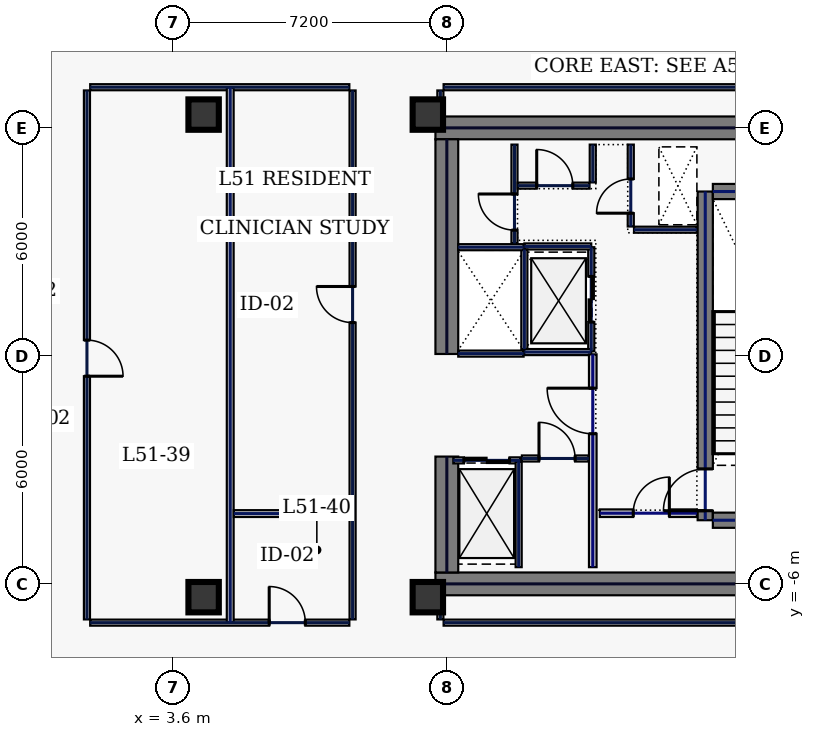
"""IFC4 building model, lengths in metres.
Left out: names, types, materials, properties, quantities, classifications, styles, units other than length and angle.
Written with IfcOpenShell. Run it as: python <this file> out.ifc"""

import sys

from ifc_helpers import new_model, si_unit, direction, frame, frame_2d, origin, origin_2d, place, context, subcontext, project, spatial, rectangle, hollow_rectangle, extrude, element, fill, save


model = new_model("IFC4")
c1 = context("Model", 3, precision=1e-05, world=origin(), true_north=direction((0.0, 1.0)))
c2 = subcontext(c1, "Body", "Model", "MODEL_VIEW")
j1 = project(units=[si_unit("LENGTHUNIT", "METRE"), si_unit("PLANEANGLEUNIT", "RADIAN")], contexts=[c1])
p1 = place(None, origin())
s1 = spatial("IfcSite", under=j1, at=p1, CompositionType="ELEMENT")
p2 = place(p1, origin())
s2 = spatial("IfcBuilding", under=s1, at=p2, CompositionType="ELEMENT")
p3 = place(p2, frame((0.0, 0.0, 222.2)))
s3 = spatial("IfcBuildingStorey", under=s2, at=p3, CompositionType="ELEMENT", Elevation=222.2)
for number, where, z_axis, x_axis in (
    (1, (10.5, 6.0, 0.0), (0.0, 0.0, 1.0), (1.0, 0.0, 0.0)),
    (2, (10.5, -6.0, 0.0), (0.0, 0.0, 1.0), (1.0, 0.0, 0.0)),
):
    element("IfcWall", number, at=place(p3, frame(where, z_axis=z_axis, x_axis=x_axis)), inside=s3, PredefinedType="SHEAR", context=c2, shape_type="SweptSolid", body=[
        extrude(rectangle(XDim=11.5, YDim=0.6, at=frame_2d((5.75, 0.0))), origin(), (0.0, 0.0, 1.0), 3.74),
    ])
p4 = place(p3, frame((10.8, -5.7, 0.0), z_axis=(0.0, 0.0, 1.0), x_axis=(0.0, 1.0, 0.0)))
e3 = element("IfcWall", 3, at=p4, inside=s3, PredefinedType="SHEAR", context=c2, shape_type="SweptSolid", body=[
    extrude(rectangle(XDim=3.05, YDim=0.6, at=frame_2d((1.525, 0.0))), origin(), (0.0, 0.0, 1.0), 3.74),
])
p5 = place(p3, frame((10.8, 0.05, 0.0), z_axis=(0.0, 0.0, 1.0), x_axis=(0.0, 1.0, 0.0)))
e4 = element("IfcWall", 4, at=p5, inside=s3, PredefinedType="SHEAR", context=c2, shape_type="SweptSolid", body=[
    extrude(rectangle(XDim=5.65, YDim=0.6, at=frame_2d((2.825, 0.0))), origin(), (0.0, 0.0, 1.0), 3.74),
])
p6 = place(p3, frame((17.6, -4.325, 0.0), z_axis=(0.0, 0.0, 1.0), x_axis=(0.0, 1.0, 0.0)))
e5 = element("IfcWall", 5, at=p6, inside=s3, PredefinedType="SHEAR", context=c2, shape_type="SweptSolid", body=[
    extrude(rectangle(XDim=8.65, YDim=0.4, at=frame_2d((4.325, 0.0))), origin(), (0.0, 0.0, 1.0), 3.74),
])
p7 = place(p6, frame((0.25, 0.0, 0.0)))
e6 = element("IfcOpeningElement", 6, at=p7, cuts=e5, PredefinedType="OPENING", context=c2, shape_type="SweptSolid", body=[
    extrude(rectangle(XDim=1.1, YDim=2.2, at=frame_2d((0.55, 1.1))), frame((0.0, 0.21, 0.0), z_axis=(0.0, -1.0, 0.0), x_axis=(1.0, 0.0, 0.0)), (0.0, 0.0, 1.0), 0.42),
])
for number, where, z_axis, x_axis in (
    (7, (17.8, -4.325, 0.0), (0.0, 0.0, 1.0), (1.0, 0.0, 0.0)),
    (8, (17.8, 4.325, 0.0), (0.0, 0.0, 1.0), (1.0, 0.0, 0.0)),
):
    element("IfcWall", number, at=place(p3, frame(where, z_axis=z_axis, x_axis=x_axis)), inside=s3, PredefinedType="SHEAR", context=c2, shape_type="SweptSolid", body=[
        extrude(rectangle(XDim=3.4, YDim=0.4, at=frame_2d((1.7, 0.0))), origin(), (0.0, 0.0, 1.0), 3.74),
    ])
for number, where, z_axis, x_axis in (
    (9, (10.3, -6.35, 0.0), (0.0, 0.0, 1.0), (1.0, 0.0, 0.0)),
    (10, (10.3, 6.35, 0.0), (0.0, 0.0, 1.0), (1.0, 0.0, 0.0)),
    (11, (4.4, -6.35, 0.0), (0.0, 0.0, 1.0), (1.0, 0.0, 0.0)),
    (12, (4.4, 6.35, 0.0), (0.0, 0.0, 1.0), (1.0, 0.0, 0.0)),
):
    element("IfcColumn", number, at=place(p3, frame(where, z_axis=z_axis, x_axis=x_axis)), inside=s3, PredefinedType="COLUMN", context=c2, shape_type="SweptSolid", body=[
        extrude(hollow_rectangle(XDim=0.8, YDim=0.8, WallThickness=0.036, at=origin_2d()), origin(), (0.0, 0.0, 1.0), 3.74),
    ])
p8 = place(p3, frame((14.6, 0.12, 0.0), z_axis=(0.0, 0.0, 1.0), x_axis=(0.0, 1.0, 0.0)))
e13 = element("IfcWall", 13, at=p8, inside=s3, PredefinedType="PARTITIONING", context=c2, shape_type="SweptSolid", body=[
    extrude(rectangle(XDim=2.74, YDim=0.16, at=frame_2d((1.37, 0.0))), origin(), (0.0, 0.0, 1.0), 3.74),
])
p9 = place(p8, frame((0.77, 0.0, 0.0)))
e14 = element("IfcOpeningElement", 14, at=p9, cuts=e13, PredefinedType="OPENING", context=c2, shape_type="SweptSolid", body=[
    extrude(rectangle(XDim=1.2, YDim=2.2, at=frame_2d((0.6, 1.1))), frame((0.0, 0.09, 0.0), z_axis=(0.0, -1.0, 0.0), x_axis=(1.0, 0.0, 0.0)), (0.0, 0.0, 1.0), 0.18),
])
for number, where, z_axis, x_axis in (
    (15, (12.84, 0.1, 0.0), (0.0, 0.0, 1.0), (1.0, 0.0, 0.0)),
    (16, (12.84, 2.88, 0.0), (0.0, 0.0, 1.0), (1.0, 0.0, 0.0)),
):
    element("IfcWall", number, at=place(p3, frame(where, z_axis=z_axis, x_axis=x_axis)), inside=s3, PredefinedType="PARTITIONING", context=c2, shape_type="SweptSolid", body=[
        extrude(rectangle(XDim=1.76, YDim=0.16, at=frame_2d((0.88, 0.0))), origin(), (0.0, 0.0, 1.0), 3.74),
    ])
p10 = place(p3, frame((12.84, 0.18, 0.0), z_axis=(0.0, 0.0, 1.0), x_axis=(0.0, 1.0, 0.0)))
e17 = element("IfcWall", 17, at=p10, inside=s3, PredefinedType="PARTITIONING", context=c2, shape_type="SweptSolid", body=[
    extrude(rectangle(XDim=2.62, YDim=0.16, at=frame_2d((1.31, 0.0))), origin(), (0.0, 0.0, 1.0), 3.74),
])
p11 = place(p3, frame((10.97, -2.75, 0.0), z_axis=(0.0, 0.0, 1.0), x_axis=(1.0, 0.0, 0.0)))
e18 = element("IfcWall", 18, at=p11, inside=s3, PredefinedType="PARTITIONING", context=c2, shape_type="SweptSolid", body=[
    extrude(rectangle(XDim=1.76, YDim=0.16, at=frame_2d((0.88, 0.0))), origin(), (0.0, 0.0, 1.0), 3.74),
])
p12 = place(p11, frame((0.28, 0.0, 0.0)))
e19 = element("IfcOpeningElement", 19, at=p12, cuts=e18, PredefinedType="OPENING", context=c2, shape_type="SweptSolid", body=[
    extrude(rectangle(XDim=1.2, YDim=2.2, at=frame_2d((0.6, 1.1))), frame((0.0, 0.09, 0.0), z_axis=(0.0, -1.0, 0.0), x_axis=(1.0, 0.0, 0.0)), (0.0, 0.0, 1.0), 0.18),
])
for number, where, z_axis, x_axis in (
    (20, (11.1, 0.06, 0.0), (0.0, 0.0, 1.0), (1.0, 0.0, 0.0)),
    (21, (11.1, 2.86, 0.0), (0.0, 0.0, 1.0), (1.0, 0.0, 0.0)),
):
    element("IfcWall", number, at=place(p3, frame(where, z_axis=z_axis, x_axis=x_axis)), inside=s3, PredefinedType="PARTITIONING", context=c2, shape_type="SweptSolid", body=[
        extrude(rectangle(XDim=1.72, YDim=0.16, at=frame_2d((0.86, 0.0))), origin(), (0.0, 0.0, 1.0), 3.74),
    ])
p13 = place(p3, frame((15.64, 3.405, 0.0), z_axis=(0.0, 0.0, 1.0), x_axis=(0.0, 1.0, 0.0)))
e22 = element("IfcWall", 22, at=p13, inside=s3, PredefinedType="PARTITIONING", context=c2, shape_type="SweptSolid", body=[
    extrude(rectangle(XDim=2.155, YDim=0.16, at=frame_2d((1.078, 0.0))), origin(), (0.0, 0.0, 1.0), 3.74),
])
p14 = place(p13, frame((0.35, 0.0, 0.0)))
e23 = element("IfcOpeningElement", 23, at=p14, cuts=e22, PredefinedType="OPENING", context=c2, shape_type="SweptSolid", body=[
    extrude(rectangle(XDim=0.9, YDim=2.2, at=frame_2d((0.45, 1.1))), frame((0.0, 0.09, 0.0), z_axis=(0.0, -1.0, 0.0), x_axis=(1.0, 0.0, 0.0)), (0.0, 0.0, 1.0), 0.18),
])
p15 = place(p3, frame((15.725, 3.32, 0.0), z_axis=(0.0, 0.0, 1.0), x_axis=(1.0, 0.0, 0.0)))
e24 = element("IfcWall", 24, at=p15, inside=s3, PredefinedType="PARTITIONING", context=c2, shape_type="SweptSolid", body=[
    extrude(rectangle(XDim=1.655, YDim=0.16, at=frame_2d((0.827, 0.0))), origin(), (0.0, 0.0, 1.0), 3.74),
])
p16 = place(p3, frame((14.825, -4.14, 0.0), z_axis=(0.0, 0.0, 1.0), x_axis=(1.0, 0.0, 0.0)))
e25 = element("IfcWall", 25, at=p16, inside=s3, PredefinedType="SOLIDWALL", context=c2, shape_type="SweptSolid", body=[
    extrude(rectangle(XDim=2.555, YDim=0.2, at=frame_2d((1.277, 0.0))), origin(), (0.0, 0.0, 1.0), 3.74),
])
p17 = place(p16, frame((0.88, 0.0, 0.0)))
e26 = element("IfcOpeningElement", 26, at=p17, cuts=e25, PredefinedType="OPENING", context=c2, shape_type="SweptSolid", body=[
    extrude(rectangle(XDim=0.95, YDim=2.2, at=frame_2d((0.475, 1.1))), frame((0.0, 0.11, 0.0), z_axis=(0.0, -1.0, 0.0), x_axis=(1.0, 0.0, 0.0)), (0.0, 0.0, 1.0), 0.22),
])
p18 = place(p3, frame((12.775, -2.7, 0.0), z_axis=(0.0, 0.0, 1.0), x_axis=(1.0, 0.0, 0.0)))
e27 = element("IfcWall", 27, at=p18, inside=s3, PredefinedType="PARTITIONING", context=c2, shape_type="SweptSolid", body=[
    extrude(rectangle(XDim=1.76, YDim=0.16, at=frame_2d((0.88, 0.0))), origin(), (0.0, 0.0, 1.0), 3.74),
])
p19 = place(p18, frame((0.45, 0.0, 0.0)))
e28 = element("IfcOpeningElement", 28, at=p19, cuts=e27, PredefinedType="OPENING", context=c2, shape_type="SweptSolid", body=[
    extrude(rectangle(XDim=0.95, YDim=2.2, at=frame_2d((0.475, 1.1))), frame((0.0, 0.09, 0.0), z_axis=(0.0, -1.0, 0.0), x_axis=(1.0, 0.0, 0.0)), (0.0, 0.0, 1.0), 0.18),
])
p20 = place(p3, frame((12.69, -5.56, 0.0), z_axis=(0.0, 0.0, 1.0), x_axis=(0.0, 1.0, 0.0)))
e29 = element("IfcWall", 29, at=p20, inside=s3, PredefinedType="PARTITIONING", context=c2, shape_type="SweptSolid", body=[
    extrude(rectangle(XDim=2.775, YDim=0.16, at=frame_2d((1.388, 0.0))), origin(), (0.0, 0.0, 1.0), 3.74),
])
p21 = place(p3, frame((12.58, 2.96, 0.0), z_axis=(0.0, 0.0, 1.0), x_axis=(0.0, 1.0, 0.0)))
e30 = element("IfcWall", 30, at=p21, inside=s3, PredefinedType="PARTITIONING", context=c2, shape_type="SweptSolid", body=[
    extrude(rectangle(XDim=2.6, YDim=0.16, at=frame_2d((1.3, 0.0))), origin(), (0.0, 0.0, 1.0), 3.74),
])
p22 = place(p21, frame((0.35, 0.0, 0.0)))
e31 = element("IfcOpeningElement", 31, at=p22, cuts=e30, PredefinedType="OPENING", context=c2, shape_type="SweptSolid", body=[
    extrude(rectangle(XDim=0.95, YDim=2.2, at=frame_2d((0.475, 1.1))), frame((0.0, 0.09, 0.0), z_axis=(0.0, -1.0, 0.0), x_axis=(1.0, 0.0, 0.0)), (0.0, 0.0, 1.0), 0.18),
])
p23 = place(p3, frame((12.665, 4.48, 0.0), z_axis=(0.0, 0.0, 1.0), x_axis=(1.0, 0.0, 0.0)))
e32 = element("IfcWall", 32, at=p23, inside=s3, PredefinedType="PARTITIONING", context=c2, shape_type="SweptSolid", body=[
    extrude(rectangle(XDim=1.89, YDim=0.16, at=frame_2d((0.945, 0.0))), origin(), (0.0, 0.0, 1.0), 3.74),
])
p24 = place(p23, frame((0.5, 0.0, 0.0)))
e33 = element("IfcOpeningElement", 33, at=p24, cuts=e32, PredefinedType="OPENING", context=c2, shape_type="SweptSolid", body=[
    extrude(rectangle(XDim=0.95, YDim=2.2, at=frame_2d((0.475, 1.1))), frame((0.0, 0.09, 0.0), z_axis=(0.0, -1.0, 0.0), x_axis=(1.0, 0.0, 0.0)), (0.0, 0.0, 1.0), 0.18),
])
p25 = place(p3, frame((14.64, 4.565, 0.0), z_axis=(0.0, 0.0, 1.0), x_axis=(0.0, 1.0, 0.0)))
e34 = element("IfcWall", 34, at=p25, inside=s3, PredefinedType="PARTITIONING", context=c2, shape_type="SweptSolid", body=[
    extrude(rectangle(XDim=0.995, YDim=0.16, at=frame_2d((0.498, 0.0))), origin(), (0.0, 0.0, 1.0), 3.74),
])
p26 = place(p3, frame((14.64, -5.56, 0.0), z_axis=(0.0, 0.0, 1.0), x_axis=(0.0, 1.0, 0.0)))
e35 = element("IfcWall", 35, at=p26, inside=s3, PredefinedType="SOLIDWALL", context=c2, shape_type="SweptSolid", body=[
    extrude(rectangle(XDim=5.6, YDim=0.2, at=frame_2d((2.8, 0.0))), origin(), (0.0, 0.0, 1.0), 3.74),
])
p27 = place(p26, frame((3.51, 0.0, 0.0)))
e36 = element("IfcOpeningElement", 36, at=p27, cuts=e35, PredefinedType="OPENING", context=c2, shape_type="SweptSolid", body=[
    extrude(rectangle(XDim=1.2, YDim=2.2, at=frame_2d((0.6, 1.1))), frame((0.0, 0.11, 0.0), z_axis=(0.0, -1.0, 0.0), x_axis=(1.0, 0.0, 0.0)), (0.0, 0.0, 1.0), 0.22),
])
p28 = place(p3, frame((24.815, 7.07, 0.0), z_axis=(0.0, 0.0, 1.0), x_axis=(-1.0, 0.0, 0.0)))
e37 = element("IfcWall", 37, at=p28, inside=s3, PredefinedType="PARTITIONING", context=c2, shape_type="SweptSolid", body=[
    extrude(rectangle(XDim=14.1, YDim=0.16, at=frame_2d((7.05, 0.0))), origin(), (0.0, 0.0, 1.0), 3.74),
])
p29 = place(p3, frame((10.63, 6.985, 0.0), z_axis=(0.0, 0.0, 1.0), x_axis=(0.0, -1.0, 0.0)))
e38 = element("IfcWall", 38, at=p29, inside=s3, PredefinedType="PARTITIONING", context=c2, shape_type="SweptSolid", body=[
    extrude(rectangle(XDim=0.565, YDim=0.16, at=frame_2d((0.283, 0.0))), origin(), (0.0, 0.0, 1.0), 3.74),
])
p30 = place(p3, frame((10.63, -6.42, 0.0), z_axis=(0.0, 0.0, 1.0), x_axis=(0.0, -1.0, 0.0)))
e39 = element("IfcWall", 39, at=p30, inside=s3, PredefinedType="PARTITIONING", context=c2, shape_type="SweptSolid", body=[
    extrude(rectangle(XDim=0.515, YDim=0.16, at=frame_2d((0.258, 0.0))), origin(), (0.0, 0.0, 1.0), 2.135),
])
p31 = place(p3, frame((10.715, -7.02, 0.0), z_axis=(0.0, 0.0, 1.0), x_axis=(1.0, 0.0, 0.0)))
e40 = element("IfcWall", 40, at=p31, inside=s3, PredefinedType="PARTITIONING", context=c2, shape_type="SweptSolid", body=[
    extrude(rectangle(XDim=14.1, YDim=0.16, at=frame_2d((7.05, 0.0))), origin(), (0.0, 0.0, 1.0), 3.74),
])
p32 = place(p3, frame((8.235, 7.07, 0.0), z_axis=(0.0, 0.0, 1.0), x_axis=(-1.0, 0.0, 0.0)))
e41 = element("IfcWall", 41, at=p32, inside=s3, PredefinedType="PARTITIONING", context=c2, shape_type="SweptSolid", body=[
    extrude(rectangle(XDim=6.82, YDim=0.16, at=frame_2d((3.41, 0.0))), origin(), (0.0, 0.0, 1.0), 3.74),
])
p33 = place(p3, frame((1.33, 6.985, 0.0), z_axis=(0.0, 0.0, 1.0), x_axis=(0.0, -1.0, 0.0)))
e42 = element("IfcWall", 42, at=p33, inside=s3, PredefinedType="PARTITIONING", context=c2, shape_type="SweptSolid", body=[
    extrude(rectangle(XDim=13.92, YDim=0.16, at=frame_2d((6.96, 0.0))), origin(), (0.0, 0.0, 1.0), 3.74),
])
p34 = place(p33, frame((6.57, 0.0, 0.0)))
e43 = element("IfcOpeningElement", 43, at=p34, cuts=e42, PredefinedType="OPENING", context=c2, shape_type="SweptSolid", body=[
    extrude(rectangle(XDim=0.95, YDim=2.2, at=frame_2d((0.475, 1.1))), frame((0.0, 0.09, 0.0), z_axis=(0.0, -1.0, 0.0), x_axis=(1.0, 0.0, 0.0)), (0.0, 0.0, 1.0), 0.18),
])
p35 = place(p3, frame((1.415, -7.02, 0.0), z_axis=(0.0, 0.0, 1.0), x_axis=(1.0, 0.0, 0.0)))
e44 = element("IfcWall", 44, at=p35, inside=s3, PredefinedType="PARTITIONING", context=c2, shape_type="SweptSolid", body=[
    extrude(rectangle(XDim=6.82, YDim=0.16, at=frame_2d((3.41, 0.0))), origin(), (0.0, 0.0, 1.0), 3.74),
])
p36 = place(p35, frame((4.711, 0.0, 0.0)))
e45 = element("IfcOpeningElement", 45, at=p36, cuts=e44, PredefinedType="OPENING", context=c2, shape_type="SweptSolid", body=[
    extrude(rectangle(XDim=0.95, YDim=2.2, at=frame_2d((0.475, 1.1))), frame((0.0, 0.09, 0.0), z_axis=(0.0, -1.0, 0.0), x_axis=(1.0, 0.0, 0.0)), (0.0, 0.0, 1.0), 0.18),
])
p37 = place(p3, frame((8.32, -6.935, 0.0), z_axis=(0.0, 0.0, 1.0), x_axis=(0.0, 1.0, 0.0)))
e46 = element("IfcWall", 46, at=p37, inside=s3, PredefinedType="PARTITIONING", context=c2, shape_type="SweptSolid", body=[
    extrude(rectangle(XDim=13.92, YDim=0.16, at=frame_2d((6.96, 0.0))), origin(), (0.0, 0.0, 1.0), 3.74),
])
p38 = place(p37, frame((7.811, 0.0, 0.0)))
e47 = element("IfcOpeningElement", 47, at=p38, cuts=e46, PredefinedType="OPENING", context=c2, shape_type="SweptSolid", body=[
    extrude(rectangle(XDim=0.95, YDim=2.2, at=frame_2d((0.475, 1.1))), frame((0.0, 0.09, 0.0), z_axis=(0.0, -1.0, 0.0), x_axis=(1.0, 0.0, 0.0)), (0.0, 0.0, 1.0), 0.18),
])
p39 = place(p3, frame((5.1, -7.015, 0.0), z_axis=(0.0, 0.0, 1.0), x_axis=(0.0, 1.0, 0.0)))
e48 = element("IfcWall", 48, at=p39, inside=s3, PredefinedType="PARTITIONING", context=c2, shape_type="SweptSolid", body=[
    extrude(rectangle(XDim=14.08, YDim=0.18, at=frame_2d((7.04, 0.0))), origin(), (0.0, 0.0, 1.0), 3.74),
])
p40 = place(p3, frame((5.195, -4.15, 0.0), z_axis=(0.0, 0.0, 1.0), x_axis=(1.0, 0.0, 0.0)))
e49 = element("IfcWall", 49, at=p40, inside=s3, PredefinedType="PARTITIONING", context=c2, shape_type="SweptSolid", body=[
    extrude(rectangle(XDim=3.12, YDim=0.18, at=frame_2d((1.56, 0.0))), origin(), (0.0, 0.0, 1.0), 3.74),
])
p41 = place(p7, origin())
e50 = element("IfcDoor", 50, at=p41, inside=s3, OperationType="SINGLE_SWING_LEFT", PredefinedType="DOOR", context=c2, shape_type="SweptSolid", body=[
    extrude(rectangle(XDim=1.1, YDim=2.2, at=frame_2d((0.55, 1.1))), frame((0.0, 0.025, 0.0), z_axis=(0.0, -1.0, 0.0), x_axis=(1.0, 0.0, 0.0)), (0.0, 0.0, 1.0), 0.05),
])
fill(e6, e50)
p42 = place(p9, origin())
e51 = element("IfcDoor", 51, at=p42, inside=s3, OperationType="SLIDING_TO_LEFT", PredefinedType="DOOR", context=c2, shape_type="SweptSolid", body=[
    extrude(rectangle(XDim=1.2, YDim=2.2, at=frame_2d((0.6, 1.1))), frame((0.0, 0.025, 0.0), z_axis=(0.0, -1.0, 0.0), x_axis=(1.0, 0.0, 0.0)), (0.0, 0.0, 1.0), 0.05),
])
fill(e14, e51)
p43 = place(p12, origin())
e52 = element("IfcDoor", 52, at=p43, inside=s3, OperationType="SLIDING_TO_LEFT", PredefinedType="DOOR", context=c2, shape_type="SweptSolid", body=[
    extrude(rectangle(XDim=1.2, YDim=2.2, at=frame_2d((0.6, 1.1))), frame((0.0, 0.025, 0.0), z_axis=(0.0, -1.0, 0.0), x_axis=(1.0, 0.0, 0.0)), (0.0, 0.0, 1.0), 0.05),
])
fill(e19, e52)
p44 = place(p14, origin())
e53 = element("IfcDoor", 53, at=p44, inside=s3, OperationType="SINGLE_SWING_LEFT", PredefinedType="DOOR", context=c2, shape_type="SweptSolid", body=[
    extrude(rectangle(XDim=0.9, YDim=2.2, at=frame_2d((0.45, 1.1))), frame((0.0, 0.025, 0.0), z_axis=(0.0, -1.0, 0.0), x_axis=(1.0, 0.0, 0.0)), (0.0, 0.0, 1.0), 0.05),
])
fill(e23, e53)
p45 = place(p17, origin())
e54 = element("IfcDoor", 54, at=p45, inside=s3, OperationType="SINGLE_SWING_RIGHT", PredefinedType="DOOR", context=c2, shape_type="SweptSolid", body=[
    extrude(rectangle(XDim=0.95, YDim=2.2, at=frame_2d((0.475, 1.1))), frame((0.0, 0.025, 0.0), z_axis=(0.0, -1.0, 0.0), x_axis=(1.0, 0.0, 0.0)), (0.0, 0.0, 1.0), 0.05),
])
fill(e26, e54)
p46 = place(p19, origin())
e55 = element("IfcDoor", 55, at=p46, inside=s3, OperationType="SINGLE_SWING_LEFT", PredefinedType="DOOR", context=c2, shape_type="SweptSolid", body=[
    extrude(rectangle(XDim=0.95, YDim=2.2, at=frame_2d((0.475, 1.1))), frame((0.0, 0.025, 0.0), z_axis=(0.0, -1.0, 0.0), x_axis=(1.0, 0.0, 0.0)), (0.0, 0.0, 1.0), 0.05),
])
fill(e28, e55)
p47 = place(p22, origin())
e56 = element("IfcDoor", 56, at=p47, inside=s3, OperationType="SINGLE_SWING_RIGHT", PredefinedType="DOOR", context=c2, shape_type="SweptSolid", body=[
    extrude(rectangle(XDim=0.95, YDim=2.2, at=frame_2d((0.475, 1.1))), frame((0.0, 0.025, 0.0), z_axis=(0.0, -1.0, 0.0), x_axis=(1.0, 0.0, 0.0)), (0.0, 0.0, 1.0), 0.05),
])
fill(e31, e56)
p48 = place(p24, origin())
e57 = element("IfcDoor", 57, at=p48, inside=s3, OperationType="SINGLE_SWING_LEFT", PredefinedType="DOOR", context=c2, shape_type="SweptSolid", body=[
    extrude(rectangle(XDim=0.95, YDim=2.2, at=frame_2d((0.475, 1.1))), frame((0.0, 0.025, 0.0), z_axis=(0.0, -1.0, 0.0), x_axis=(1.0, 0.0, 0.0)), (0.0, 0.0, 1.0), 0.05),
])
fill(e33, e57)
p49 = place(p27, origin())
e58 = element("IfcDoor", 58, at=p49, inside=s3, OperationType="SINGLE_SWING_RIGHT", PredefinedType="DOOR", context=c2, shape_type="SweptSolid", body=[
    extrude(rectangle(XDim=1.2, YDim=2.2, at=frame_2d((0.6, 1.1))), frame((0.0, 0.025, 0.0), z_axis=(0.0, -1.0, 0.0), x_axis=(1.0, 0.0, 0.0)), (0.0, 0.0, 1.0), 0.05),
])
fill(e36, e58)
p50 = place(p34, origin())
e59 = element("IfcDoor", 59, at=p50, inside=s3, OperationType="SINGLE_SWING_RIGHT", PredefinedType="DOOR", context=c2, shape_type="SweptSolid", body=[
    extrude(rectangle(XDim=0.95, YDim=2.2, at=frame_2d((0.475, 1.1))), frame((0.0, 0.025, 0.0), z_axis=(0.0, -1.0, 0.0), x_axis=(1.0, 0.0, 0.0)), (0.0, 0.0, 1.0), 0.05),
])
fill(e43, e59)
p51 = place(p36, origin())
e60 = element("IfcDoor", 60, at=p51, inside=s3, OperationType="SINGLE_SWING_LEFT", PredefinedType="DOOR", context=c2, shape_type="SweptSolid", body=[
    extrude(rectangle(XDim=0.95, YDim=2.2, at=frame_2d((0.475, 1.1))), frame((0.0, 0.025, 0.0), z_axis=(0.0, -1.0, 0.0), x_axis=(1.0, 0.0, 0.0)), (0.0, 0.0, 1.0), 0.05),
])
fill(e45, e60)
p52 = place(p38, origin())
e61 = element("IfcDoor", 61, at=p52, inside=s3, OperationType="SINGLE_SWING_RIGHT", PredefinedType="DOOR", context=c2, shape_type="SweptSolid", body=[
    extrude(rectangle(XDim=0.95, YDim=2.2, at=frame_2d((0.475, 1.1))), frame((0.0, 0.025, 0.0), z_axis=(0.0, -1.0, 0.0), x_axis=(1.0, 0.0, 0.0)), (0.0, 0.0, 1.0), 0.05),
])
fill(e47, e61)
save(model, sys.argv[1])
